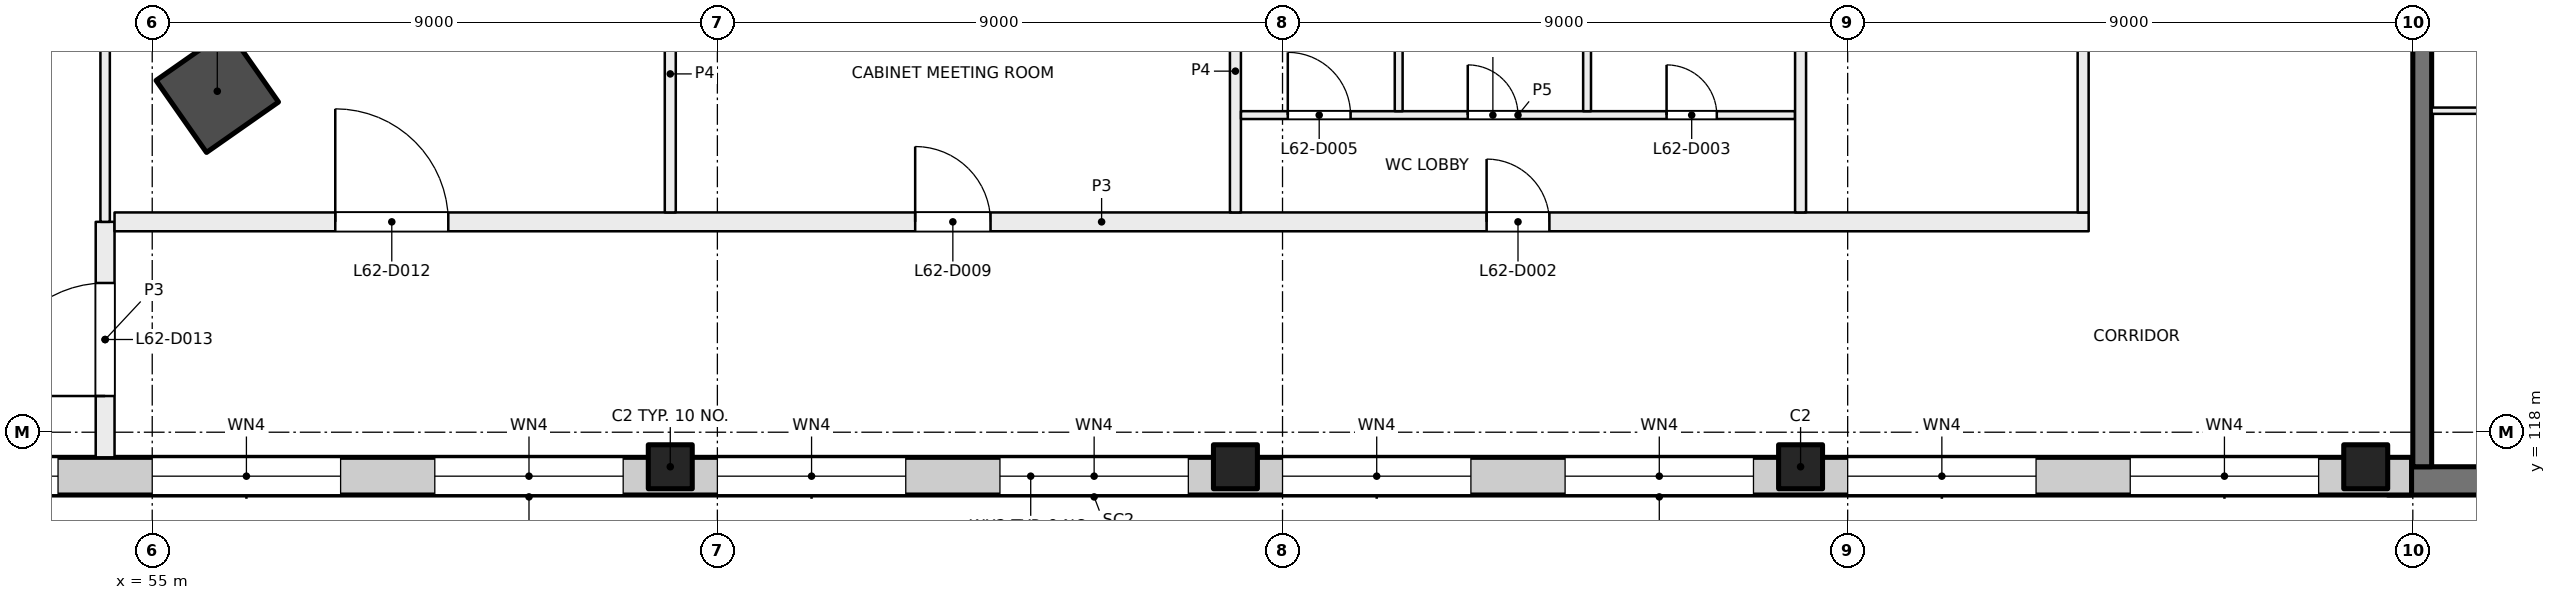
"""IFC4 building model, lengths in metres.
Left out: names, types, materials, properties, quantities, classifications, styles, units other than length and angle.
Written with IfcOpenShell. Run it as: python <this file> out.ifc"""

import sys

from ifc_helpers import new_model, si_unit, direction, frame, frame_2d, origin, origin_2d, place, context, subcontext, project, spatial, rectangle, hollow_rectangle, extrude, element, fill, save


model = new_model("IFC4")
c1 = context("Model", 3, precision=1e-05, world=origin(), true_north=direction((0.0, 1.0)))
c2 = subcontext(c1, "Body", "Model", "MODEL_VIEW")
j1 = project(units=[si_unit("LENGTHUNIT", "METRE"), si_unit("PLANEANGLEUNIT", "RADIAN")], contexts=[c1])
p1 = place(None, origin())
s1 = spatial("IfcSite", under=j1, at=p1, CompositionType="ELEMENT")
p2 = place(p1, origin())
s2 = spatial("IfcBuilding", under=s1, at=p2, CompositionType="ELEMENT")
p3 = place(p2, frame((0.0, 0.0, 261.5)))
s3 = spatial("IfcBuildingStorey", under=s2, at=p3, CompositionType="ELEMENT", Elevation=261.5)
p4 = place(p3, frame((56.036, 123.43, 0.0), z_axis=(0.0, 0.0, 1.0), x_axis=(0.573576436351, -0.819152044289, 0.0)))
e1 = element("IfcColumn", 1, at=p4, inside=s3, PredefinedType="COLUMN", context=c2, shape_type="SweptSolid", body=[
    extrude(hollow_rectangle(XDim=1.4, YDim=1.4, WallThickness=0.025, at=origin_2d()), origin(), (0.0, 0.0, 1.0), 4.0),
])
for number, where, z_axis, x_axis in (
    (2, (63.25, 117.45, 0.0), (0.0, 0.0, 1.0), (1.0, 0.0, 0.0)),
    (3, (72.25, 117.45, 0.0), (0.0, 0.0, 1.0), (1.0, 0.0, 0.0)),
    (4, (81.25, 117.45, 0.0), (0.0, 0.0, 1.0), (1.0, 0.0, 0.0)),
    (5, (90.25, 117.45, 0.0), (0.0, 0.0, 1.0), (1.0, 0.0, 0.0)),
):
    element("IfcColumn", number, at=place(p3, frame(where, z_axis=z_axis, x_axis=x_axis)), inside=s3, PredefinedType="COLUMN", context=c2, shape_type="SweptSolid", body=[
        extrude(rectangle(XDim=0.7, YDim=0.7, at=origin_2d()), origin(), (0.0, 0.0, 1.0), 4.0),
    ])
p5 = place(p3, frame((99.6, 117.225, 0.0), z_axis=(0.0, 0.0, 1.0), x_axis=(-1.0, 0.0, 0.0)))
e6 = element("IfcWall", 6, at=p5, inside=s3, PredefinedType="SHEAR", context=c2, shape_type="SweptSolid", body=[
    extrude(rectangle(XDim=9.0, YDim=0.45, at=frame_2d((4.5, 0.0))), origin(), (0.0, 0.0, 1.0), 4.0),
])
p6 = place(p3, frame((91.15, 126.2, 0.0), z_axis=(0.0, 0.0, 1.0), x_axis=(0.0, -1.0, 0.0)))
e7 = element("IfcWall", 7, at=p6, inside=s3, PredefinedType="SHEAR", context=c2, shape_type="SweptSolid", body=[
    extrude(rectangle(XDim=8.75, YDim=0.3, at=frame_2d((4.375, 0.0))), origin(), (0.0, 0.0, 1.0), 4.0),
])
p7 = place(p3, frame((90.98, 117.3, 0.0), z_axis=(0.0, 0.0, 1.0), x_axis=(-1.0, 0.0, 0.0)))
e8 = element("IfcWall", 8, at=p7, inside=s3, PredefinedType="SOLIDWALL", context=c2, shape_type="SweptSolid", body=[
    extrude(rectangle(XDim=43.98, YDim=0.6, at=frame_2d((21.99, 0.0))), origin(), (0.0, 0.0, 1.0), 3.625),
])
p8 = place(p7, frame((1.48, 0.0, 0.9)))
e9 = element("IfcOpeningElement", 9, at=p8, cuts=e8, PredefinedType="OPENING", context=c2, shape_type="SweptSolid", body=[
    extrude(rectangle(XDim=3.0, YDim=2.4, at=frame_2d((1.5, 1.2))), frame((0.0, 0.31, 0.0), z_axis=(0.0, -1.0, 0.0), x_axis=(1.0, 0.0, 0.0)), (0.0, 0.0, 1.0), 0.62),
])
p9 = place(p7, frame((5.98, 0.0, 0.9)))
e10 = element("IfcOpeningElement", 10, at=p9, cuts=e8, PredefinedType="OPENING", context=c2, shape_type="SweptSolid", body=[
    extrude(rectangle(XDim=3.0, YDim=2.4, at=frame_2d((1.5, 1.2))), frame((0.0, 0.31, 0.0), z_axis=(0.0, -1.0, 0.0), x_axis=(1.0, 0.0, 0.0)), (0.0, 0.0, 1.0), 0.62),
])
p10 = place(p7, frame((10.48, 0.0, 0.9)))
e11 = element("IfcOpeningElement", 11, at=p10, cuts=e8, PredefinedType="OPENING", context=c2, shape_type="SweptSolid", body=[
    extrude(rectangle(XDim=3.0, YDim=2.4, at=frame_2d((1.5, 1.2))), frame((0.0, 0.31, 0.0), z_axis=(0.0, -1.0, 0.0), x_axis=(1.0, 0.0, 0.0)), (0.0, 0.0, 1.0), 0.62),
])
p11 = place(p7, frame((14.98, 0.0, 0.9)))
e12 = element("IfcOpeningElement", 12, at=p11, cuts=e8, PredefinedType="OPENING", context=c2, shape_type="SweptSolid", body=[
    extrude(rectangle(XDim=3.0, YDim=2.4, at=frame_2d((1.5, 1.2))), frame((0.0, 0.31, 0.0), z_axis=(0.0, -1.0, 0.0), x_axis=(1.0, 0.0, 0.0)), (0.0, 0.0, 1.0), 0.62),
])
p12 = place(p7, frame((19.48, 0.0, 0.9)))
e13 = element("IfcOpeningElement", 13, at=p12, cuts=e8, PredefinedType="OPENING", context=c2, shape_type="SweptSolid", body=[
    extrude(rectangle(XDim=3.0, YDim=2.4, at=frame_2d((1.5, 1.2))), frame((0.0, 0.31, 0.0), z_axis=(0.0, -1.0, 0.0), x_axis=(1.0, 0.0, 0.0)), (0.0, 0.0, 1.0), 0.62),
])
p13 = place(p7, frame((23.98, 0.0, 0.9)))
e14 = element("IfcOpeningElement", 14, at=p13, cuts=e8, PredefinedType="OPENING", context=c2, shape_type="SweptSolid", body=[
    extrude(rectangle(XDim=3.0, YDim=2.4, at=frame_2d((1.5, 1.2))), frame((0.0, 0.31, 0.0), z_axis=(0.0, -1.0, 0.0), x_axis=(1.0, 0.0, 0.0)), (0.0, 0.0, 1.0), 0.62),
])
p14 = place(p7, frame((28.48, 0.0, 0.9)))
e15 = element("IfcOpeningElement", 15, at=p14, cuts=e8, PredefinedType="OPENING", context=c2, shape_type="SweptSolid", body=[
    extrude(rectangle(XDim=3.0, YDim=2.4, at=frame_2d((1.5, 1.2))), frame((0.0, 0.31, 0.0), z_axis=(0.0, -1.0, 0.0), x_axis=(1.0, 0.0, 0.0)), (0.0, 0.0, 1.0), 0.62),
])
p15 = place(p7, frame((32.98, 0.0, 0.9)))
e16 = element("IfcOpeningElement", 16, at=p15, cuts=e8, PredefinedType="OPENING", context=c2, shape_type="SweptSolid", body=[
    extrude(rectangle(XDim=3.0, YDim=2.4, at=frame_2d((1.5, 1.2))), frame((0.0, 0.31, 0.0), z_axis=(0.0, -1.0, 0.0), x_axis=(1.0, 0.0, 0.0)), (0.0, 0.0, 1.0), 0.62),
])
p16 = place(p7, frame((37.48, 0.0, 0.9)))
e17 = element("IfcOpeningElement", 17, at=p16, cuts=e8, PredefinedType="OPENING", context=c2, shape_type="SweptSolid", body=[
    extrude(rectangle(XDim=3.0, YDim=2.4, at=frame_2d((1.5, 1.2))), frame((0.0, 0.31, 0.0), z_axis=(0.0, -1.0, 0.0), x_axis=(1.0, 0.0, 0.0)), (0.0, 0.0, 1.0), 0.62),
])
p17 = place(p3, frame((93.4, 123.12, 0.0), z_axis=(0.0, 0.0, 1.0), x_axis=(-1.0, 0.0, 0.0)))
e18 = element("IfcWall", 18, at=p17, inside=s3, PredefinedType="PARTITIONING", context=c2, shape_type="SweptSolid", body=[
    extrude(rectangle(XDim=2.1, YDim=0.1, at=frame_2d((1.05, 0.0))), origin(), (0.0, 0.0, 1.0), 3.625),
])
p18 = place(p3, frame((54.25, 117.6, 0.0), z_axis=(0.0, 0.0, 1.0), x_axis=(0.0, 1.0, 0.0)))
e19 = element("IfcWall", 19, at=p18, inside=s3, PredefinedType="PARTITIONING", context=c2, shape_type="SweptSolid", body=[
    extrude(rectangle(XDim=3.75, YDim=0.3, at=frame_2d((1.875, 0.0))), origin(), (0.0, 0.0, 1.0), 3.625),
])
p19 = place(p18, frame((0.977, 0.0, 0.0)))
e20 = element("IfcOpeningElement", 20, at=p19, cuts=e19, PredefinedType="OPENING", context=c2, shape_type="SweptSolid", body=[
    extrude(rectangle(XDim=1.8, YDim=2.1, at=frame_2d((0.9, 1.05))), frame((0.0, 0.16, 0.0), z_axis=(0.0, -1.0, 0.0), x_axis=(1.0, 0.0, 0.0)), (0.0, 0.0, 1.0), 0.32),
])
p20 = place(p3, frame((54.4, 121.35, 0.0), z_axis=(0.0, 0.0, 1.0), x_axis=(1.0, 0.0, 0.0)))
e21 = element("IfcWall", 21, at=p20, inside=s3, PredefinedType="PARTITIONING", context=c2, shape_type="SweptSolid", body=[
    extrude(rectangle(XDim=31.438, YDim=0.3, at=frame_2d((15.719, 0.0))), origin(), (0.0, 0.0, 1.0), 3.625),
])
p21 = place(p20, frame((21.85, 0.0, 0.0)))
e22 = element("IfcOpeningElement", 22, at=p21, cuts=e21, PredefinedType="OPENING", context=c2, shape_type="SweptSolid", body=[
    extrude(rectangle(XDim=1.0, YDim=2.1, at=frame_2d((0.5, 1.05))), frame((0.0, 0.16, 0.0), z_axis=(0.0, -1.0, 0.0), x_axis=(1.0, 0.0, 0.0)), (0.0, 0.0, 1.0), 0.32),
])
p22 = place(p20, frame((12.75, 0.0, 0.0)))
e23 = element("IfcOpeningElement", 23, at=p22, cuts=e21, PredefinedType="OPENING", context=c2, shape_type="SweptSolid", body=[
    extrude(rectangle(XDim=1.2, YDim=2.1, at=frame_2d((0.6, 1.05))), frame((0.0, 0.16, 0.0), z_axis=(0.0, -1.0, 0.0), x_axis=(1.0, 0.0, 0.0)), (0.0, 0.0, 1.0), 0.32),
])
p23 = place(p20, frame((3.515, 0.0, 0.0)))
e24 = element("IfcOpeningElement", 24, at=p23, cuts=e21, PredefinedType="OPENING", context=c2, shape_type="SweptSolid", body=[
    extrude(rectangle(XDim=1.8, YDim=2.1, at=frame_2d((0.9, 1.05))), frame((0.0, 0.16, 0.0), z_axis=(0.0, -1.0, 0.0), x_axis=(1.0, 0.0, 0.0)), (0.0, 0.0, 1.0), 0.32),
])
p24 = place(p3, frame((54.25, 138.4, 0.0), z_axis=(0.0, 0.0, 1.0), x_axis=(0.0, -1.0, 0.0)))
e25 = element("IfcWall", 25, at=p24, inside=s3, PredefinedType="PARTITIONING", context=c2, shape_type="SweptSolid", body=[
    extrude(rectangle(XDim=17.05, YDim=0.15, at=frame_2d((8.525, 0.0))), origin(), (0.0, 0.0, 1.0), 3.625),
])
p25 = place(p3, frame((63.25, 125.912, 0.0), z_axis=(0.0, 0.0, 1.0), x_axis=(0.0, -1.0, 0.0)))
e26 = element("IfcWall", 26, at=p25, inside=s3, PredefinedType="PARTITIONING", context=c2, shape_type="SweptSolid", body=[
    extrude(rectangle(XDim=4.412, YDim=0.175, at=frame_2d((2.206, 0.0))), origin(), (0.0, 0.0, 1.0), 3.625),
])
p26 = place(p3, frame((72.25, 121.5, 0.0), z_axis=(0.0, 0.0, 1.0), x_axis=(0.0, 1.0, 0.0)))
e27 = element("IfcWall", 27, at=p26, inside=s3, PredefinedType="PARTITIONING", context=c2, shape_type="SweptSolid", body=[
    extrude(rectangle(XDim=4.5, YDim=0.175, at=frame_2d((2.25, 0.0))), origin(), (0.0, 0.0, 1.0), 3.625),
])
p27 = place(p3, frame((72.338, 123.05, 0.0), z_axis=(0.0, 0.0, 1.0), x_axis=(1.0, 0.0, 0.0)))
e28 = element("IfcWall", 28, at=p27, inside=s3, PredefinedType="PARTITIONING", context=c2, shape_type="SweptSolid", body=[
    extrude(rectangle(XDim=8.824, YDim=0.125, at=frame_2d((4.412, 0.0))), origin(), (0.0, 0.0, 1.0), 3.625),
])
p28 = place(p27, frame((6.778, 0.0, 0.0)))
e29 = element("IfcOpeningElement", 29, at=p28, cuts=e28, PredefinedType="OPENING", context=c2, shape_type="SweptSolid", body=[
    extrude(rectangle(XDim=0.8, YDim=2.1, at=frame_2d((0.4, 1.05))), frame((0.0, 0.073, 0.0), z_axis=(0.0, -1.0, 0.0), x_axis=(1.0, 0.0, 0.0)), (0.0, 0.0, 1.0), 0.145),
])
p29 = place(p27, frame((3.612, 0.0, 0.0)))
e30 = element("IfcOpeningElement", 30, at=p29, cuts=e28, PredefinedType="OPENING", context=c2, shape_type="SweptSolid", body=[
    extrude(rectangle(XDim=0.8, YDim=2.1, at=frame_2d((0.4, 1.05))), frame((0.0, 0.073, 0.0), z_axis=(0.0, -1.0, 0.0), x_axis=(1.0, 0.0, 0.0)), (0.0, 0.0, 1.0), 0.145),
])
p30 = place(p27, frame((0.746, 0.0, 0.0)))
e31 = element("IfcOpeningElement", 31, at=p30, cuts=e28, PredefinedType="OPENING", context=c2, shape_type="SweptSolid", body=[
    extrude(rectangle(XDim=1.0, YDim=2.1, at=frame_2d((0.5, 1.05))), frame((0.0, 0.073, 0.0), z_axis=(0.0, -1.0, 0.0), x_axis=(1.0, 0.0, 0.0)), (0.0, 0.0, 1.0), 0.145),
])
for number, where, z_axis, x_axis in (
    (32, (74.85, 125.938, 0.0), (0.0, 0.0, 1.0), (0.0, -1.0, 0.0)),
    (33, (77.85, 125.938, 0.0), (0.0, 0.0, 1.0), (0.0, -1.0, 0.0)),
):
    element("IfcWall", number, at=place(p3, frame(where, z_axis=z_axis, x_axis=x_axis)), inside=s3, PredefinedType="PARTITIONING", context=c2, shape_type="SweptSolid", body=[
        extrude(rectangle(XDim=2.826, YDim=0.125, at=frame_2d((1.413, 0.0))), origin(), (0.0, 0.0, 1.0), 3.625),
    ])
p31 = place(p3, frame((81.25, 132.5, 0.0), z_axis=(0.0, 0.0, 1.0), x_axis=(0.0, -1.0, 0.0)))
e34 = element("IfcWall", 34, at=p31, inside=s3, PredefinedType="PARTITIONING", context=c2, shape_type="SweptSolid", body=[
    extrude(rectangle(XDim=11.0, YDim=0.175, at=frame_2d((5.5, 0.0))), origin(), (0.0, 0.0, 1.0), 3.625),
])
p32 = place(p31, frame((3.652, 0.0, 0.0)))
e35 = element("IfcOpeningElement", 35, at=p32, cuts=e34, PredefinedType="OPENING", context=c2, shape_type="SweptSolid", body=[
    extrude(rectangle(XDim=1.2, YDim=2.1, at=frame_2d((0.6, 1.05))), frame((0.0, 0.097, 0.0), z_axis=(0.0, -1.0, 0.0), x_axis=(1.0, 0.0, 0.0)), (0.0, 0.0, 1.0), 0.195),
])
p33 = place(p3, frame((85.75, 121.5, 0.0), z_axis=(0.0, 0.0, 1.0), x_axis=(0.0, 1.0, 0.0)))
e36 = element("IfcWall", 36, at=p33, inside=s3, PredefinedType="PARTITIONING", context=c2, shape_type="SweptSolid", body=[
    extrude(rectangle(XDim=16.9, YDim=0.175, at=frame_2d((8.45, 0.0))), origin(), (0.0, 0.0, 1.0), 3.625),
])
p34 = place(p8, origin())
e37 = element("IfcWindow", 37, at=p34, inside=s3, PartitioningType="SINGLE_PANEL", PredefinedType="WINDOW", context=c2, shape_type="SweptSolid", body=[
    extrude(rectangle(XDim=3.0, YDim=2.4, at=frame_2d((1.5, 1.2))), frame((0.0, 0.03, 0.0), z_axis=(0.0, -1.0, 0.0), x_axis=(1.0, 0.0, 0.0)), (0.0, 0.0, 1.0), 0.06),
])
fill(e9, e37)
p35 = place(p9, origin())
e38 = element("IfcWindow", 38, at=p35, inside=s3, PartitioningType="SINGLE_PANEL", PredefinedType="WINDOW", context=c2, shape_type="SweptSolid", body=[
    extrude(rectangle(XDim=3.0, YDim=2.4, at=frame_2d((1.5, 1.2))), frame((0.0, 0.03, 0.0), z_axis=(0.0, -1.0, 0.0), x_axis=(1.0, 0.0, 0.0)), (0.0, 0.0, 1.0), 0.06),
])
fill(e10, e38)
p36 = place(p10, origin())
e39 = element("IfcWindow", 39, at=p36, inside=s3, PartitioningType="SINGLE_PANEL", PredefinedType="WINDOW", context=c2, shape_type="SweptSolid", body=[
    extrude(rectangle(XDim=3.0, YDim=2.4, at=frame_2d((1.5, 1.2))), frame((0.0, 0.03, 0.0), z_axis=(0.0, -1.0, 0.0), x_axis=(1.0, 0.0, 0.0)), (0.0, 0.0, 1.0), 0.06),
])
fill(e11, e39)
p37 = place(p11, origin())
e40 = element("IfcWindow", 40, at=p37, inside=s3, PartitioningType="SINGLE_PANEL", PredefinedType="WINDOW", context=c2, shape_type="SweptSolid", body=[
    extrude(rectangle(XDim=3.0, YDim=2.4, at=frame_2d((1.5, 1.2))), frame((0.0, 0.03, 0.0), z_axis=(0.0, -1.0, 0.0), x_axis=(1.0, 0.0, 0.0)), (0.0, 0.0, 1.0), 0.06),
])
fill(e12, e40)
p38 = place(p12, origin())
e41 = element("IfcWindow", 41, at=p38, inside=s3, PartitioningType="SINGLE_PANEL", PredefinedType="WINDOW", context=c2, shape_type="SweptSolid", body=[
    extrude(rectangle(XDim=3.0, YDim=2.4, at=frame_2d((1.5, 1.2))), frame((0.0, 0.03, 0.0), z_axis=(0.0, -1.0, 0.0), x_axis=(1.0, 0.0, 0.0)), (0.0, 0.0, 1.0), 0.06),
])
fill(e13, e41)
p39 = place(p13, origin())
e42 = element("IfcWindow", 42, at=p39, inside=s3, PartitioningType="SINGLE_PANEL", PredefinedType="WINDOW", context=c2, shape_type="SweptSolid", body=[
    extrude(rectangle(XDim=3.0, YDim=2.4, at=frame_2d((1.5, 1.2))), frame((0.0, 0.03, 0.0), z_axis=(0.0, -1.0, 0.0), x_axis=(1.0, 0.0, 0.0)), (0.0, 0.0, 1.0), 0.06),
])
fill(e14, e42)
p40 = place(p14, origin())
e43 = element("IfcWindow", 43, at=p40, inside=s3, PartitioningType="SINGLE_PANEL", PredefinedType="WINDOW", context=c2, shape_type="SweptSolid", body=[
    extrude(rectangle(XDim=3.0, YDim=2.4, at=frame_2d((1.5, 1.2))), frame((0.0, 0.03, 0.0), z_axis=(0.0, -1.0, 0.0), x_axis=(1.0, 0.0, 0.0)), (0.0, 0.0, 1.0), 0.06),
])
fill(e15, e43)
p41 = place(p15, origin())
e44 = element("IfcWindow", 44, at=p41, inside=s3, PartitioningType="SINGLE_PANEL", PredefinedType="WINDOW", context=c2, shape_type="SweptSolid", body=[
    extrude(rectangle(XDim=3.0, YDim=2.4, at=frame_2d((1.5, 1.2))), frame((0.0, 0.03, 0.0), z_axis=(0.0, -1.0, 0.0), x_axis=(1.0, 0.0, 0.0)), (0.0, 0.0, 1.0), 0.06),
])
fill(e16, e44)
p42 = place(p16, origin())
e45 = element("IfcWindow", 45, at=p42, inside=s3, PartitioningType="SINGLE_PANEL", PredefinedType="WINDOW", context=c2, shape_type="SweptSolid", body=[
    extrude(rectangle(XDim=3.0, YDim=2.4, at=frame_2d((1.5, 1.2))), frame((0.0, 0.03, 0.0), z_axis=(0.0, -1.0, 0.0), x_axis=(1.0, 0.0, 0.0)), (0.0, 0.0, 1.0), 0.06),
])
fill(e17, e45)
p43 = place(p21, origin())
e46 = element("IfcDoor", 46, at=p43, inside=s3, OperationType="SINGLE_SWING_LEFT", PredefinedType="DOOR", context=c2, shape_type="SweptSolid", body=[
    extrude(rectangle(XDim=1.0, YDim=2.1, at=frame_2d((0.5, 1.05))), frame((0.0, 0.025, 0.0), z_axis=(0.0, -1.0, 0.0), x_axis=(1.0, 0.0, 0.0)), (0.0, 0.0, 1.0), 0.05),
])
fill(e22, e46)
p44 = place(p28, origin())
e47 = element("IfcDoor", 47, at=p44, inside=s3, OperationType="SINGLE_SWING_RIGHT", PredefinedType="DOOR", context=c2, shape_type="SweptSolid", body=[
    extrude(rectangle(XDim=0.8, YDim=2.1, at=frame_2d((0.4, 1.05))), frame((0.0, 0.025, 0.0), z_axis=(0.0, -1.0, 0.0), x_axis=(1.0, 0.0, 0.0)), (0.0, 0.0, 1.0), 0.05),
])
fill(e29, e47)
p45 = place(p29, origin())
e48 = element("IfcDoor", 48, at=p45, inside=s3, OperationType="SINGLE_SWING_LEFT", PredefinedType="DOOR", context=c2, shape_type="SweptSolid", body=[
    extrude(rectangle(XDim=0.8, YDim=2.1, at=frame_2d((0.4, 1.05))), frame((0.0, 0.025, 0.0), z_axis=(0.0, -1.0, 0.0), x_axis=(1.0, 0.0, 0.0)), (0.0, 0.0, 1.0), 0.05),
])
fill(e30, e48)
p46 = place(p30, origin())
e49 = element("IfcDoor", 49, at=p46, inside=s3, OperationType="SINGLE_SWING_LEFT", PredefinedType="DOOR", context=c2, shape_type="SweptSolid", body=[
    extrude(rectangle(XDim=1.0, YDim=2.1, at=frame_2d((0.5, 1.05))), frame((0.0, 0.025, 0.0), z_axis=(0.0, -1.0, 0.0), x_axis=(1.0, 0.0, 0.0)), (0.0, 0.0, 1.0), 0.05),
])
fill(e31, e49)
p47 = place(p22, origin())
e50 = element("IfcDoor", 50, at=p47, inside=s3, OperationType="DOUBLE_DOOR_SINGLE_SWING", PredefinedType="DOOR", context=c2, shape_type="SweptSolid", body=[
    extrude(rectangle(XDim=1.2, YDim=2.1, at=frame_2d((0.6, 1.05))), frame((0.0, 0.025, 0.0), z_axis=(0.0, -1.0, 0.0), x_axis=(1.0, 0.0, 0.0)), (0.0, 0.0, 1.0), 0.05),
])
fill(e23, e50)
p48 = place(p23, origin())
e51 = element("IfcDoor", 51, at=p48, inside=s3, OperationType="DOUBLE_DOOR_SINGLE_SWING", PredefinedType="DOOR", context=c2, shape_type="SweptSolid", body=[
    extrude(rectangle(XDim=1.8, YDim=2.1, at=frame_2d((0.9, 1.05))), frame((0.0, 0.025, 0.0), z_axis=(0.0, -1.0, 0.0), x_axis=(1.0, 0.0, 0.0)), (0.0, 0.0, 1.0), 0.05),
])
fill(e24, e51)
p49 = place(p19, origin())
e52 = element("IfcDoor", 52, at=p49, inside=s3, OperationType="DOUBLE_DOOR_SINGLE_SWING", PredefinedType="DOOR", context=c2, shape_type="SweptSolid", body=[
    extrude(rectangle(XDim=1.8, YDim=2.1, at=frame_2d((0.9, 1.05))), frame((0.0, 0.025, 0.0), z_axis=(0.0, -1.0, 0.0), x_axis=(1.0, 0.0, 0.0)), (0.0, 0.0, 1.0), 0.05),
])
fill(e20, e52)
save(model, sys.argv[1])
